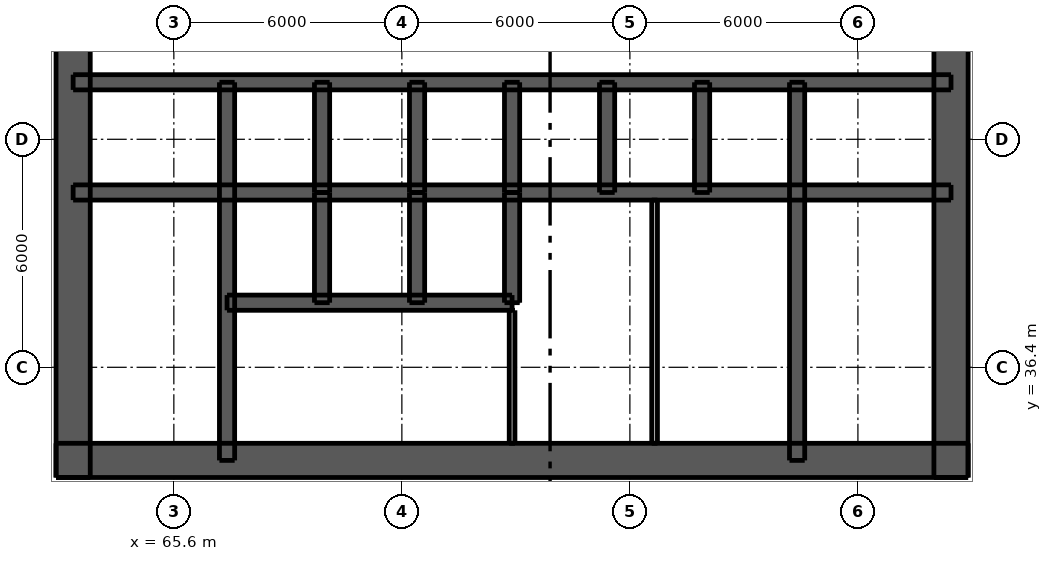
"""IFC4 building model, lengths in metres.
Left out: names, types, materials, properties, quantities, classifications, styles, units other than length and angle.
Written with IfcOpenShell. Run it as: python <this file> out.ifc"""

import sys

from ifc_helpers import new_model, si_unit, direction, frame, frame_2d, origin, place, context, subcontext, project, spatial, rectangle, extrude, element, fill, save


model = new_model("IFC4")
c1 = context("Model", 3, precision=1e-05, world=origin(), true_north=direction((0.0, 1.0)))
c2 = subcontext(c1, "Body", "Model", "MODEL_VIEW")
j1 = project(units=[si_unit("LENGTHUNIT", "METRE"), si_unit("PLANEANGLEUNIT", "RADIAN")], contexts=[c1])
p1 = place(None, origin())
s1 = spatial("IfcSite", under=j1, at=p1, CompositionType="ELEMENT")
p2 = place(p1, origin())
s2 = spatial("IfcBuilding", under=s1, at=p2, CompositionType="ELEMENT")
p3 = place(p2, origin())
s3 = spatial("IfcBuildingStorey", under=s2, at=p3, CompositionType="ELEMENT", Elevation=0.0)
p4 = place(p3, frame((62.5, 33.95, -2.5), z_axis=(0.0, 0.0, 1.0), x_axis=(1.0, 0.0, 0.0)))
e1 = element("IfcWall", 1, at=p4, inside=s3, PredefinedType="SHEAR", context=c2, shape_type="SweptSolid", body=[
    extrude(rectangle(XDim=24.0, YDim=0.9, at=frame_2d((12.0, 0.0))), origin(), (0.0, 0.0, 1.0), 7.7),
])
p5 = place(p4, frame((2.05, 0.0, 2.5)))
e2 = element("IfcOpeningElement", 2, at=p5, cuts=e1, PredefinedType="OPENING", context=c2, shape_type="SweptSolid", body=[
    extrude(rectangle(XDim=1.1, YDim=2.1, at=frame_2d((0.55, 1.05))), frame((0.0, 0.46, 0.0), z_axis=(0.0, -1.0, 0.0), x_axis=(1.0, 0.0, 0.0)), (0.0, 0.0, 1.0), 0.92),
])
p6 = place(p4, frame((20.85, 0.0, 2.5)))
e3 = element("IfcOpeningElement", 3, at=p6, cuts=e1, PredefinedType="OPENING", context=c2, shape_type="SweptSolid", body=[
    extrude(rectangle(XDim=1.1, YDim=2.1, at=frame_2d((0.55, 1.05))), frame((0.0, 0.46, 0.0), z_axis=(0.0, -1.0, 0.0), x_axis=(1.0, 0.0, 0.0)), (0.0, 0.0, 1.0), 0.92),
])
p7 = place(p4, frame((8.0, 0.0, 2.5)))
e4 = element("IfcOpeningElement", 4, at=p7, cuts=e1, PredefinedType="OPENING", context=c2, shape_type="SweptSolid", body=[
    extrude(rectangle(XDim=1.1, YDim=2.1, at=frame_2d((0.55, 1.05))), frame((0.0, 0.46, 0.0), z_axis=(0.0, -1.0, 0.0), x_axis=(1.0, 0.0, 0.0)), (0.0, 0.0, 1.0), 0.92),
])
p8 = place(p4, frame((13.525, 0.0, 2.5)))
e5 = element("IfcOpeningElement", 5, at=p8, cuts=e1, PredefinedType="OPENING", context=c2, shape_type="SweptSolid", body=[
    extrude(rectangle(XDim=0.9, YDim=2.1, at=frame_2d((0.45, 1.05))), frame((0.0, 0.46, 0.0), z_axis=(0.0, -1.0, 0.0), x_axis=(1.0, 0.0, 0.0)), (0.0, 0.0, 1.0), 0.92),
])
p9 = place(p4, frame((17.075, 0.0, 2.5)))
e6 = element("IfcOpeningElement", 6, at=p9, cuts=e1, PredefinedType="OPENING", context=c2, shape_type="SweptSolid", body=[
    extrude(rectangle(XDim=0.9, YDim=2.1, at=frame_2d((0.45, 1.05))), frame((0.0, 0.46, 0.0), z_axis=(0.0, -1.0, 0.0), x_axis=(1.0, 0.0, 0.0)), (0.0, 0.0, 1.0), 0.92),
])
p10 = place(p3, frame((62.95, 33.5, -2.5), z_axis=(0.0, 0.0, 1.0), x_axis=(0.0, 1.0, 0.0)))
e7 = element("IfcWall", 7, at=p10, inside=s3, PredefinedType="SHEAR", context=c2, shape_type="SweptSolid", body=[
    extrude(rectangle(XDim=24.0, YDim=0.9, at=frame_2d((12.0, 0.0))), origin(), (0.0, 0.0, 1.0), 7.7),
])
p11 = place(p10, frame((11.2, 0.0, 2.5)))
e8 = element("IfcOpeningElement", 8, at=p11, cuts=e7, PredefinedType="OPENING", context=c2, shape_type="SweptSolid", body=[
    extrude(rectangle(XDim=1.6, YDim=2.1, at=frame_2d((0.8, 1.05))), frame((0.0, 0.46, 0.0), z_axis=(0.0, -1.0, 0.0), x_axis=(1.0, 0.0, 0.0)), (0.0, 0.0, 1.0), 0.92),
])
p12 = place(p3, frame((86.05, 33.5, -2.5), z_axis=(0.0, 0.0, 1.0), x_axis=(0.0, 1.0, 0.0)))
e9 = element("IfcWall", 9, at=p12, inside=s3, PredefinedType="SHEAR", context=c2, shape_type="SweptSolid", body=[
    extrude(rectangle(XDim=24.0, YDim=0.9, at=frame_2d((12.0, 0.0))), origin(), (0.0, 0.0, 1.0), 7.7),
])
p13 = place(p12, frame((11.2, 0.0, 2.5)))
e10 = element("IfcOpeningElement", 10, at=p13, cuts=e9, PredefinedType="OPENING", context=c2, shape_type="SweptSolid", body=[
    extrude(rectangle(XDim=1.6, YDim=2.1, at=frame_2d((0.8, 1.05))), frame((0.0, 0.46, 0.0), z_axis=(0.0, -1.0, 0.0), x_axis=(1.0, 0.0, 0.0)), (0.0, 0.0, 1.0), 0.92),
])
p14 = place(p3, frame((62.95, 41.0, -2.5), z_axis=(0.0, 0.0, 1.0), x_axis=(1.0, 0.0, 0.0)))
e11 = element("IfcWall", 11, at=p14, inside=s3, PredefinedType="SHEAR", context=c2, shape_type="SweptSolid", body=[
    extrude(rectangle(XDim=23.1, YDim=0.4, at=frame_2d((11.55, 0.0))), origin(), (0.0, 0.0, 1.0), 7.7),
])
p15 = place(p3, frame((62.95, 43.9, -2.5), z_axis=(0.0, 0.0, 1.0), x_axis=(1.0, 0.0, 0.0)))
e12 = element("IfcWall", 12, at=p15, inside=s3, PredefinedType="SHEAR", context=c2, shape_type="SweptSolid", body=[
    extrude(rectangle(XDim=23.1, YDim=0.4, at=frame_2d((11.55, 0.0))), origin(), (0.0, 0.0, 1.0), 7.7),
])
p16 = place(p15, frame((1.7, 0.0, 2.5)))
e13 = element("IfcOpeningElement", 13, at=p16, cuts=e12, PredefinedType="OPENING", context=c2, shape_type="SweptSolid", body=[
    extrude(rectangle(XDim=0.9, YDim=2.1, at=frame_2d((0.45, 1.05))), frame((0.0, 0.21, 0.0), z_axis=(0.0, -1.0, 0.0), x_axis=(1.0, 0.0, 0.0)), (0.0, 0.0, 1.0), 0.42),
])
p17 = place(p15, frame((20.5, 0.0, 2.5)))
e14 = element("IfcOpeningElement", 14, at=p17, cuts=e12, PredefinedType="OPENING", context=c2, shape_type="SweptSolid", body=[
    extrude(rectangle(XDim=0.9, YDim=2.1, at=frame_2d((0.45, 1.05))), frame((0.0, 0.21, 0.0), z_axis=(0.0, -1.0, 0.0), x_axis=(1.0, 0.0, 0.0)), (0.0, 0.0, 1.0), 0.42),
])
p18 = place(p15, frame((4.75, 0.0, 2.5)))
e15 = element("IfcOpeningElement", 15, at=p18, cuts=e12, PredefinedType="OPENING", context=c2, shape_type="SweptSolid", body=[
    extrude(rectangle(XDim=1.1, YDim=2.1, at=frame_2d((0.55, 1.05))), frame((0.0, 0.21, 0.0), z_axis=(0.0, -1.0, 0.0), x_axis=(1.0, 0.0, 0.0)), (0.0, 0.0, 1.0), 0.42),
])
p19 = place(p15, frame((7.25, 0.0, 2.5)))
e16 = element("IfcOpeningElement", 16, at=p19, cuts=e12, PredefinedType="OPENING", context=c2, shape_type="SweptSolid", body=[
    extrude(rectangle(XDim=1.1, YDim=2.1, at=frame_2d((0.55, 1.05))), frame((0.0, 0.21, 0.0), z_axis=(0.0, -1.0, 0.0), x_axis=(1.0, 0.0, 0.0)), (0.0, 0.0, 1.0), 0.42),
])
p20 = place(p15, frame((9.75, 0.0, 2.5)))
e17 = element("IfcOpeningElement", 17, at=p20, cuts=e12, PredefinedType="OPENING", context=c2, shape_type="SweptSolid", body=[
    extrude(rectangle(XDim=1.1, YDim=2.1, at=frame_2d((0.55, 1.05))), frame((0.0, 0.21, 0.0), z_axis=(0.0, -1.0, 0.0), x_axis=(1.0, 0.0, 0.0)), (0.0, 0.0, 1.0), 0.42),
])
p21 = place(p15, frame((12.25, 0.0, 2.5)))
e18 = element("IfcOpeningElement", 18, at=p21, cuts=e12, PredefinedType="OPENING", context=c2, shape_type="SweptSolid", body=[
    extrude(rectangle(XDim=1.1, YDim=2.1, at=frame_2d((0.55, 1.05))), frame((0.0, 0.21, 0.0), z_axis=(0.0, -1.0, 0.0), x_axis=(1.0, 0.0, 0.0)), (0.0, 0.0, 1.0), 0.42),
])
p22 = place(p15, frame((14.75, 0.0, 2.5)))
e19 = element("IfcOpeningElement", 19, at=p22, cuts=e12, PredefinedType="OPENING", context=c2, shape_type="SweptSolid", body=[
    extrude(rectangle(XDim=1.1, YDim=2.1, at=frame_2d((0.55, 1.05))), frame((0.0, 0.21, 0.0), z_axis=(0.0, -1.0, 0.0), x_axis=(1.0, 0.0, 0.0)), (0.0, 0.0, 1.0), 0.42),
])
p23 = place(p15, frame((17.25, 0.0, 2.5)))
e20 = element("IfcOpeningElement", 20, at=p23, cuts=e12, PredefinedType="OPENING", context=c2, shape_type="SweptSolid", body=[
    extrude(rectangle(XDim=1.1, YDim=2.1, at=frame_2d((0.55, 1.05))), frame((0.0, 0.21, 0.0), z_axis=(0.0, -1.0, 0.0), x_axis=(1.0, 0.0, 0.0)), (0.0, 0.0, 1.0), 0.42),
])
p24 = place(p3, frame((67.0, 33.95, -2.5), z_axis=(0.0, 0.0, 1.0), x_axis=(0.0, 1.0, 0.0)))
e21 = element("IfcWall", 21, at=p24, inside=s3, PredefinedType="SHEAR", context=c2, shape_type="SweptSolid", body=[
    extrude(rectangle(XDim=9.95, YDim=0.4, at=frame_2d((4.975, 0.0))), origin(), (0.0, 0.0, 1.0), 7.7),
])
p25 = place(p24, frame((0.65, 0.0, 2.5)))
e22 = element("IfcOpeningElement", 22, at=p25, cuts=e21, PredefinedType="OPENING", context=c2, shape_type="SweptSolid", body=[
    extrude(rectangle(XDim=1.1, YDim=2.1, at=frame_2d((0.55, 1.05))), frame((0.0, 0.21, 0.0), z_axis=(0.0, -1.0, 0.0), x_axis=(1.0, 0.0, 0.0)), (0.0, 0.0, 1.0), 0.42),
])
p26 = place(p3, frame((82.0, 33.95, -2.5), z_axis=(0.0, 0.0, 1.0), x_axis=(0.0, 1.0, 0.0)))
e23 = element("IfcWall", 23, at=p26, inside=s3, PredefinedType="SHEAR", context=c2, shape_type="SweptSolid", body=[
    extrude(rectangle(XDim=9.95, YDim=0.4, at=frame_2d((4.975, 0.0))), origin(), (0.0, 0.0, 1.0), 7.7),
])
for number, where, z_axis, x_axis in (
    (24, (69.5, 41.0, -2.5), (0.0, 0.0, 1.0), (0.0, 1.0, 0.0)),
    (25, (72.0, 41.0, -2.5), (0.0, 0.0, 1.0), (0.0, 1.0, 0.0)),
    (26, (74.5, 41.0, -2.5), (0.0, 0.0, 1.0), (0.0, 1.0, 0.0)),
    (27, (77.0, 41.0, -2.5), (0.0, 0.0, 1.0), (0.0, 1.0, 0.0)),
    (28, (79.5, 41.0, -2.5), (0.0, 0.0, 1.0), (0.0, 1.0, 0.0)),
):
    element("IfcWall", number, at=place(p3, frame(where, z_axis=z_axis, x_axis=x_axis)), inside=s3, PredefinedType="SHEAR", context=c2, shape_type="SweptSolid", body=[
        extrude(rectangle(XDim=2.9, YDim=0.4, at=frame_2d((1.45, 0.0))), origin(), (0.0, 0.0, 1.0), 7.7),
    ])
p27 = place(p3, frame((67.0, 38.1, -2.5), z_axis=(0.0, 0.0, 1.0), x_axis=(1.0, 0.0, 0.0)))
e29 = element("IfcWall", 29, at=p27, inside=s3, PredefinedType="SHEAR", context=c2, shape_type="SweptSolid", body=[
    extrude(rectangle(XDim=7.5, YDim=0.4, at=frame_2d((3.75, 0.0))), origin(), (0.0, 0.0, 1.0), 7.7),
])
p28 = place(p27, frame((0.7, 0.0, 2.5)))
e30 = element("IfcOpeningElement", 30, at=p28, cuts=e29, PredefinedType="OPENING", context=c2, shape_type="SweptSolid", body=[
    extrude(rectangle(XDim=1.1, YDim=2.1, at=frame_2d((0.55, 1.05))), frame((0.0, 0.21, 0.0), z_axis=(0.0, -1.0, 0.0), x_axis=(1.0, 0.0, 0.0)), (0.0, 0.0, 1.0), 0.42),
])
p29 = place(p27, frame((3.2, 0.0, 2.5)))
e31 = element("IfcOpeningElement", 31, at=p29, cuts=e29, PredefinedType="OPENING", context=c2, shape_type="SweptSolid", body=[
    extrude(rectangle(XDim=1.1, YDim=2.1, at=frame_2d((0.55, 1.05))), frame((0.0, 0.21, 0.0), z_axis=(0.0, -1.0, 0.0), x_axis=(1.0, 0.0, 0.0)), (0.0, 0.0, 1.0), 0.42),
])
p30 = place(p27, frame((5.65, 0.0, 2.5)))
e32 = element("IfcOpeningElement", 32, at=p30, cuts=e29, PredefinedType="OPENING", context=c2, shape_type="SweptSolid", body=[
    extrude(rectangle(XDim=1.2, YDim=2.1, at=frame_2d((0.6, 1.05))), frame((0.0, 0.21, 0.0), z_axis=(0.0, -1.0, 0.0), x_axis=(1.0, 0.0, 0.0)), (0.0, 0.0, 1.0), 0.42),
])
for number, where, z_axis, x_axis in (
    (33, (69.5, 38.1, -2.5), (0.0, 0.0, 1.0), (0.0, 1.0, 0.0)),
    (34, (72.0, 38.1, -2.5), (0.0, 0.0, 1.0), (0.0, 1.0, 0.0)),
    (35, (74.5, 38.1, -2.5), (0.0, 0.0, 1.0), (0.0, 1.0, 0.0)),
):
    element("IfcWall", number, at=place(p3, frame(where, z_axis=z_axis, x_axis=x_axis)), inside=s3, PredefinedType="SHEAR", context=c2, shape_type="SweptSolid", body=[
        extrude(rectangle(XDim=2.9, YDim=0.4, at=frame_2d((1.45, 0.0))), origin(), (0.0, 0.0, 1.0), 7.7),
    ])
p31 = place(p3, frame((74.5, 34.4, 0.0), z_axis=(0.0, 0.0, 1.0), x_axis=(0.0, 1.0, 0.0)))
e36 = element("IfcWall", 36, at=p31, inside=s3, PredefinedType="PLUMBINGWALL", context=c2, shape_type="SweptSolid", body=[
    extrude(rectangle(XDim=3.5, YDim=0.15, at=frame_2d((1.75, 0.0))), origin(), (0.0, 0.0, 1.0), 5.2),
])
p32 = place(p3, frame((78.25, 34.4, 0.0), z_axis=(0.0, 0.0, 1.0), x_axis=(0.0, 1.0, 0.0)))
e37 = element("IfcWall", 37, at=p32, inside=s3, PredefinedType="PLUMBINGWALL", context=c2, shape_type="SweptSolid", body=[
    extrude(rectangle(XDim=6.4, YDim=0.15, at=frame_2d((3.2, 0.0))), origin(), (0.0, 0.0, 1.0), 5.2),
])
p33 = place(p5, origin())
e38 = element("IfcDoor", 38, at=p33, inside=s3, OperationType="SINGLE_SWING_LEFT", PredefinedType="DOOR", context=c2, shape_type="SweptSolid", body=[
    extrude(rectangle(XDim=1.1, YDim=2.1, at=frame_2d((0.55, 1.05))), frame((0.0, 0.438, 0.0), z_axis=(0.0, -1.0, 0.0), x_axis=(1.0, 0.0, 0.0)), (0.0, 0.0, 1.0), 0.05),
])
fill(e2, e38)
p34 = place(p6, origin())
e39 = element("IfcDoor", 39, at=p34, inside=s3, OperationType="SINGLE_SWING_RIGHT", PredefinedType="DOOR", context=c2, shape_type="SweptSolid", body=[
    extrude(rectangle(XDim=1.1, YDim=2.1, at=frame_2d((0.55, 1.05))), frame((0.0, 0.438, 0.0), z_axis=(0.0, -1.0, 0.0), x_axis=(1.0, 0.0, 0.0)), (0.0, 0.0, 1.0), 0.05),
])
fill(e3, e39)
p35 = place(p7, origin())
e40 = element("IfcDoor", 40, at=p35, inside=s3, OperationType="SINGLE_SWING_LEFT", PredefinedType="DOOR", context=c2, shape_type="SweptSolid", body=[
    extrude(rectangle(XDim=1.1, YDim=2.1, at=frame_2d((0.55, 1.05))), frame((0.0, 0.438, 0.0), z_axis=(0.0, -1.0, 0.0), x_axis=(1.0, 0.0, 0.0)), (0.0, 0.0, 1.0), 0.05),
])
fill(e4, e40)
p36 = place(p25, origin())
e41 = element("IfcDoor", 41, at=p36, inside=s3, OperationType="SINGLE_SWING_RIGHT", PredefinedType="DOOR", context=c2, shape_type="SweptSolid", body=[
    extrude(rectangle(XDim=1.1, YDim=2.1, at=frame_2d((0.55, 1.05))), frame((0.0, -0.138, 0.0), z_axis=(0.0, -1.0, 0.0), x_axis=(1.0, 0.0, 0.0)), (0.0, 0.0, 1.0), 0.05),
])
fill(e22, e41)
p37 = place(p8, origin())
e42 = element("IfcDoor", 42, at=p37, inside=s3, OperationType="SINGLE_SWING_LEFT", PredefinedType="DOOR", context=c2, shape_type="SweptSolid", body=[
    extrude(rectangle(XDim=0.9, YDim=2.1, at=frame_2d((0.45, 1.05))), frame((0.0, 0.438, 0.0), z_axis=(0.0, -1.0, 0.0), x_axis=(1.0, 0.0, 0.0)), (0.0, 0.0, 1.0), 0.05),
])
fill(e5, e42)
p38 = place(p9, origin())
e43 = element("IfcDoor", 43, at=p38, inside=s3, OperationType="SINGLE_SWING_LEFT", PredefinedType="DOOR", context=c2, shape_type="SweptSolid", body=[
    extrude(rectangle(XDim=0.9, YDim=2.1, at=frame_2d((0.45, 1.05))), frame((0.0, 0.438, 0.0), z_axis=(0.0, -1.0, 0.0), x_axis=(1.0, 0.0, 0.0)), (0.0, 0.0, 1.0), 0.05),
])
fill(e6, e43)
p39 = place(p16, origin())
e44 = element("IfcDoor", 44, at=p39, inside=s3, OperationType="SINGLE_SWING_LEFT", PredefinedType="DOOR", context=c2, shape_type="SweptSolid", body=[
    extrude(rectangle(XDim=0.9, YDim=2.1, at=frame_2d((0.45, 1.05))), frame((0.0, -0.138, 0.0), z_axis=(0.0, -1.0, 0.0), x_axis=(1.0, 0.0, 0.0)), (0.0, 0.0, 1.0), 0.05),
])
fill(e13, e44)
p40 = place(p17, origin())
e45 = element("IfcDoor", 45, at=p40, inside=s3, OperationType="SINGLE_SWING_LEFT", PredefinedType="DOOR", context=c2, shape_type="SweptSolid", body=[
    extrude(rectangle(XDim=0.9, YDim=2.1, at=frame_2d((0.45, 1.05))), frame((0.0, -0.138, 0.0), z_axis=(0.0, -1.0, 0.0), x_axis=(1.0, 0.0, 0.0)), (0.0, 0.0, 1.0), 0.05),
])
fill(e14, e45)
p41 = place(p18, origin())
e46 = element("IfcDoor", 46, at=p41, inside=s3, OperationType="DOUBLE_DOOR_SLIDING", PredefinedType="DOOR", context=c2, shape_type="SweptSolid", body=[
    extrude(rectangle(XDim=1.1, YDim=2.1, at=frame_2d((0.55, 1.05))), frame((0.0, 0.025, 0.0), z_axis=(0.0, -1.0, 0.0), x_axis=(1.0, 0.0, 0.0)), (0.0, 0.0, 1.0), 0.05),
])
fill(e15, e46)
p42 = place(p19, origin())
e47 = element("IfcDoor", 47, at=p42, inside=s3, OperationType="DOUBLE_DOOR_SLIDING", PredefinedType="DOOR", context=c2, shape_type="SweptSolid", body=[
    extrude(rectangle(XDim=1.1, YDim=2.1, at=frame_2d((0.55, 1.05))), frame((0.0, 0.025, 0.0), z_axis=(0.0, -1.0, 0.0), x_axis=(1.0, 0.0, 0.0)), (0.0, 0.0, 1.0), 0.05),
])
fill(e16, e47)
p43 = place(p20, origin())
e48 = element("IfcDoor", 48, at=p43, inside=s3, OperationType="DOUBLE_DOOR_SLIDING", PredefinedType="DOOR", context=c2, shape_type="SweptSolid", body=[
    extrude(rectangle(XDim=1.1, YDim=2.1, at=frame_2d((0.55, 1.05))), frame((0.0, 0.025, 0.0), z_axis=(0.0, -1.0, 0.0), x_axis=(1.0, 0.0, 0.0)), (0.0, 0.0, 1.0), 0.05),
])
fill(e17, e48)
p44 = place(p21, origin())
e49 = element("IfcDoor", 49, at=p44, inside=s3, OperationType="DOUBLE_DOOR_SLIDING", PredefinedType="DOOR", context=c2, shape_type="SweptSolid", body=[
    extrude(rectangle(XDim=1.1, YDim=2.1, at=frame_2d((0.55, 1.05))), frame((0.0, 0.025, 0.0), z_axis=(0.0, -1.0, 0.0), x_axis=(1.0, 0.0, 0.0)), (0.0, 0.0, 1.0), 0.05),
])
fill(e18, e49)
p45 = place(p22, origin())
e50 = element("IfcDoor", 50, at=p45, inside=s3, OperationType="DOUBLE_DOOR_SLIDING", PredefinedType="DOOR", context=c2, shape_type="SweptSolid", body=[
    extrude(rectangle(XDim=1.1, YDim=2.1, at=frame_2d((0.55, 1.05))), frame((0.0, 0.025, 0.0), z_axis=(0.0, -1.0, 0.0), x_axis=(1.0, 0.0, 0.0)), (0.0, 0.0, 1.0), 0.05),
])
fill(e19, e50)
p46 = place(p23, origin())
e51 = element("IfcDoor", 51, at=p46, inside=s3, OperationType="DOUBLE_DOOR_SLIDING", PredefinedType="DOOR", context=c2, shape_type="SweptSolid", body=[
    extrude(rectangle(XDim=1.1, YDim=2.1, at=frame_2d((0.55, 1.05))), frame((0.0, 0.025, 0.0), z_axis=(0.0, -1.0, 0.0), x_axis=(1.0, 0.0, 0.0)), (0.0, 0.0, 1.0), 0.05),
])
fill(e20, e51)
p47 = place(p28, origin())
e52 = element("IfcDoor", 52, at=p47, inside=s3, OperationType="DOUBLE_DOOR_SLIDING", PredefinedType="DOOR", context=c2, shape_type="SweptSolid", body=[
    extrude(rectangle(XDim=1.1, YDim=2.1, at=frame_2d((0.55, 1.05))), frame((0.0, 0.025, 0.0), z_axis=(0.0, -1.0, 0.0), x_axis=(1.0, 0.0, 0.0)), (0.0, 0.0, 1.0), 0.05),
])
fill(e30, e52)
p48 = place(p29, origin())
e53 = element("IfcDoor", 53, at=p48, inside=s3, OperationType="DOUBLE_DOOR_SLIDING", PredefinedType="DOOR", context=c2, shape_type="SweptSolid", body=[
    extrude(rectangle(XDim=1.1, YDim=2.1, at=frame_2d((0.55, 1.05))), frame((0.0, 0.025, 0.0), z_axis=(0.0, -1.0, 0.0), x_axis=(1.0, 0.0, 0.0)), (0.0, 0.0, 1.0), 0.05),
])
fill(e31, e53)
p49 = place(p30, origin())
e54 = element("IfcDoor", 54, at=p49, inside=s3, OperationType="DOUBLE_DOOR_SLIDING", PredefinedType="DOOR", context=c2, shape_type="SweptSolid", body=[
    extrude(rectangle(XDim=1.2, YDim=2.1, at=frame_2d((0.6, 1.05))), frame((0.0, 0.025, 0.0), z_axis=(0.0, -1.0, 0.0), x_axis=(1.0, 0.0, 0.0)), (0.0, 0.0, 1.0), 0.05),
])
fill(e32, e54)
save(model, sys.argv[1])
